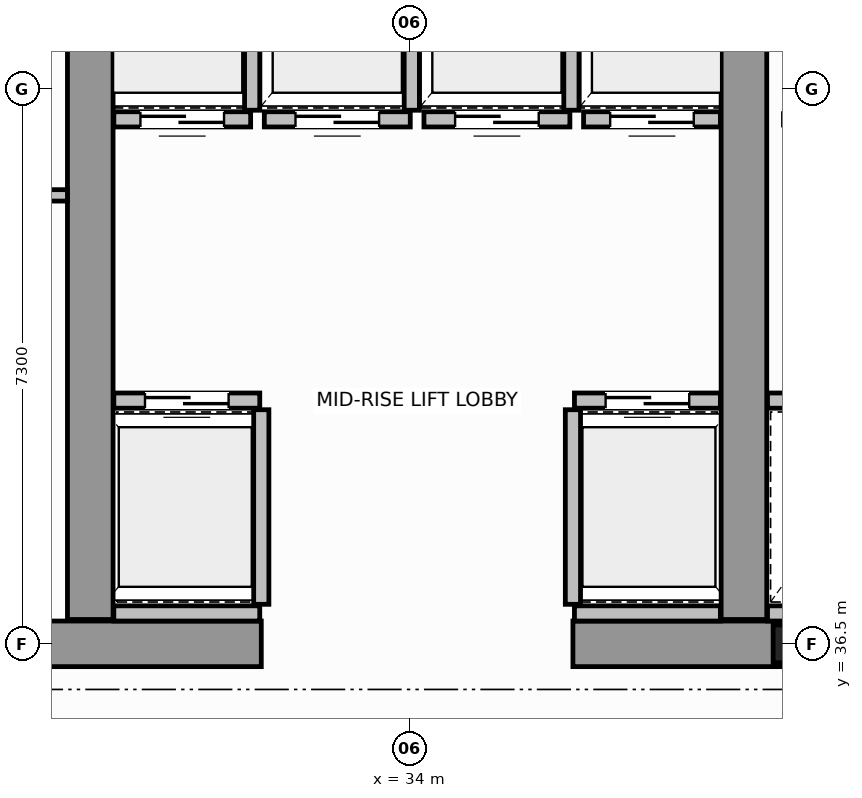
"""IFC4 building model, lengths in metres.
Left out: names, types, materials, properties, quantities, classifications, styles, units other than length and angle.
Written with IfcOpenShell. Run it as: python <this file> out.ifc"""

import sys

from ifc_helpers import new_model, si_unit, direction, frame, frame_2d, origin, origin_2d, place, context, subcontext, project, spatial, rectangle, i_section, extrude, source, transform, mapped, element, fill, save


model = new_model("IFC4")
c1 = context("Model", 3, precision=1e-05, world=origin(), true_north=direction((0.0, 1.0)))
c2 = subcontext(c1, "Body", "Model", "MODEL_VIEW")
j1 = project(units=[si_unit("LENGTHUNIT", "METRE"), si_unit("PLANEANGLEUNIT", "RADIAN")], contexts=[c1])
p1 = place(None, origin())
s1 = spatial("IfcSite", under=j1, at=p1, CompositionType="ELEMENT")
p2 = place(p1, origin())
s2 = spatial("IfcBuilding", under=s1, at=p2, CompositionType="ELEMENT")
p3 = place(p2, frame((0.0, 0.0, 184.2)))
s3 = spatial("IfcBuildingStorey", under=s2, at=p3, CompositionType="ELEMENT", Elevation=184.2)
m1 = source(origin(), c2, "Body", "SweptSolid", [
    extrude(i_section(OverallWidth=0.432, OverallDepth=0.498, WebThickness=0.055, FlangeThickness=0.068, FilletRadius=0.015, at=origin_2d()), origin(), (0.0, 0.0, 1.0), 3.8),
])
p4 = place(p3, frame((39.0, 36.5, 0.0), z_axis=(0.0, 0.0, 1.0), x_axis=(1.0, 0.0, 0.0)))
e1 = element("IfcColumn", 1, at=p4, inside=s3, PredefinedType="COLUMN", context=c2, shape_type="MappedRepresentation", body=[
    mapped(m1, transform((0.0, 0.0, 0.0), scale=1.0)),
])
for number, where, z_axis, x_axis in (
    (2, (27.55, 36.5, 0.0), (0.0, 0.0, 1.0), (1.0, 0.0, 0.0)),
    (3, (36.15, 36.5, 0.0), (0.0, 0.0, 1.0), (1.0, 0.0, 0.0)),
):
    element("IfcWall", number, at=place(p3, frame(where, z_axis=z_axis, x_axis=x_axis)), inside=s3, PredefinedType="SHEAR", context=c2, shape_type="SweptSolid", body=[
        extrude(rectangle(XDim=4.5, YDim=0.6, at=frame_2d((2.25, 0.0))), origin(), (0.0, 0.0, 1.0), 3.8),
    ])
for number, where, z_axis, x_axis in (
    (4, (29.8, 36.82, 0.0), (0.0, 0.0, 1.0), (0.0, 1.0, 0.0)),
    (5, (38.4, 36.82, 0.0), (0.0, 0.0, 1.0), (0.0, 1.0, 0.0)),
):
    element("IfcWall", number, at=place(p3, frame(where, z_axis=z_axis, x_axis=x_axis)), inside=s3, PredefinedType="SHEAR", context=c2, shape_type="SweptSolid", body=[
        extrude(rectangle(XDim=9.38, YDim=0.6, at=frame_2d((4.69, 0.0))), origin(), (0.0, 0.0, 1.0), 3.8),
    ])
p5 = place(p3, frame((30.11, 39.7, 0.0), z_axis=(0.0, 0.0, 1.0), x_axis=(1.0, 0.0, 0.0)))
e6 = element("IfcWall", 6, at=p5, inside=s3, PredefinedType="SOLIDWALL", context=c2, shape_type="SweptSolid", body=[
    extrude(rectangle(XDim=1.92, YDim=0.2, at=frame_2d((0.96, 0.0))), origin(), (0.0, 0.0, 1.0), 3.58),
])
p6 = place(p5, frame((0.41, 0.0, 0.0)))
e7 = element("IfcOpeningElement", 7, at=p6, cuts=e6, PredefinedType="OPENING", context=c2, shape_type="SweptSolid", body=[
    extrude(rectangle(XDim=1.1, YDim=2.15, at=frame_2d((0.55, 1.075))), frame((0.0, 0.11, 0.0), z_axis=(0.0, -1.0, 0.0), x_axis=(1.0, 0.0, 0.0)), (0.0, 0.0, 1.0), 0.22),
])
p7 = place(p3, frame((30.11, 36.9, 0.0), z_axis=(0.0, 0.0, 1.0), x_axis=(1.0, 0.0, 0.0)))
e8 = element("IfcWall", 8, at=p7, inside=s3, PredefinedType="SOLIDWALL", context=c2, shape_type="SweptSolid", body=[
    extrude(rectangle(XDim=1.92, YDim=0.2, at=frame_2d((0.96, 0.0))), origin(), (0.0, 0.0, 1.0), 3.58),
])
p8 = place(p3, frame((32.05, 37.02, 0.0), z_axis=(0.0, 0.0, 1.0), x_axis=(0.0, 1.0, 0.0)))
e9 = element("IfcWall", 9, at=p8, inside=s3, PredefinedType="SOLIDWALL", context=c2, shape_type="SweptSolid", body=[
    extrude(rectangle(XDim=2.56, YDim=0.2, at=frame_2d((1.28, 0.0))), origin(), (0.0, 0.0, 1.0), 3.58),
])
p9 = place(p3, frame((36.17, 39.7, 0.0), z_axis=(0.0, 0.0, 1.0), x_axis=(1.0, 0.0, 0.0)))
e10 = element("IfcWall", 10, at=p9, inside=s3, PredefinedType="SOLIDWALL", context=c2, shape_type="SweptSolid", body=[
    extrude(rectangle(XDim=1.92, YDim=0.2, at=frame_2d((0.96, 0.0))), origin(), (0.0, 0.0, 1.0), 3.58),
])
p10 = place(p9, frame((0.41, 0.0, 0.0)))
e11 = element("IfcOpeningElement", 11, at=p10, cuts=e10, PredefinedType="OPENING", context=c2, shape_type="SweptSolid", body=[
    extrude(rectangle(XDim=1.1, YDim=2.15, at=frame_2d((0.55, 1.075))), frame((0.0, 0.11, 0.0), z_axis=(0.0, -1.0, 0.0), x_axis=(1.0, 0.0, 0.0)), (0.0, 0.0, 1.0), 0.22),
])
p11 = place(p3, frame((36.17, 36.9, 0.0), z_axis=(0.0, 0.0, 1.0), x_axis=(1.0, 0.0, 0.0)))
e12 = element("IfcWall", 12, at=p11, inside=s3, PredefinedType="SOLIDWALL", context=c2, shape_type="SweptSolid", body=[
    extrude(rectangle(XDim=1.92, YDim=0.2, at=frame_2d((0.96, 0.0))), origin(), (0.0, 0.0, 1.0), 3.58),
])
p12 = place(p3, frame((36.15, 37.02, 0.0), z_axis=(0.0, 0.0, 1.0), x_axis=(0.0, 1.0, 0.0)))
e13 = element("IfcWall", 13, at=p12, inside=s3, PredefinedType="SOLIDWALL", context=c2, shape_type="SweptSolid", body=[
    extrude(rectangle(XDim=2.56, YDim=0.2, at=frame_2d((1.28, 0.0))), origin(), (0.0, 0.0, 1.0), 3.58),
])
p13 = place(p3, frame((30.11, 43.4, 0.0), z_axis=(0.0, 0.0, 1.0), x_axis=(1.0, 0.0, 0.0)))
e14 = element("IfcWall", 14, at=p13, inside=s3, PredefinedType="SOLIDWALL", context=c2, shape_type="SweptSolid", body=[
    extrude(rectangle(XDim=1.8, YDim=0.2, at=frame_2d((0.9, 0.0))), origin(), (0.0, 0.0, 1.0), 3.58),
])
p14 = place(p13, frame((0.35, 0.0, 0.0)))
e15 = element("IfcOpeningElement", 15, at=p14, cuts=e14, PredefinedType="OPENING", context=c2, shape_type="SweptSolid", body=[
    extrude(rectangle(XDim=1.1, YDim=2.15, at=frame_2d((0.55, 1.075))), frame((0.0, 0.11, 0.0), z_axis=(0.0, -1.0, 0.0), x_axis=(1.0, 0.0, 0.0)), (0.0, 0.0, 1.0), 0.22),
])
p15 = place(p3, frame((31.93, 43.52, 0.0), z_axis=(0.0, 0.0, 1.0), x_axis=(0.0, 1.0, 0.0)))
e16 = element("IfcWall", 16, at=p15, inside=s3, PredefinedType="SOLIDWALL", context=c2, shape_type="SweptSolid", body=[
    extrude(rectangle(XDim=2.56, YDim=0.2, at=frame_2d((1.28, 0.0))), origin(), (0.0, 0.0, 1.0), 3.58),
])
p16 = place(p3, frame((32.09, 43.4, 0.0), z_axis=(0.0, 0.0, 1.0), x_axis=(1.0, 0.0, 0.0)))
e17 = element("IfcWall", 17, at=p16, inside=s3, PredefinedType="SOLIDWALL", context=c2, shape_type="SweptSolid", body=[
    extrude(rectangle(XDim=1.92, YDim=0.2, at=frame_2d((0.96, 0.0))), origin(), (0.0, 0.0, 1.0), 3.58),
])
p17 = place(p16, frame((0.41, 0.0, 0.0)))
e18 = element("IfcOpeningElement", 18, at=p17, cuts=e17, PredefinedType="OPENING", context=c2, shape_type="SweptSolid", body=[
    extrude(rectangle(XDim=1.1, YDim=2.15, at=frame_2d((0.55, 1.075))), frame((0.0, 0.11, 0.0), z_axis=(0.0, -1.0, 0.0), x_axis=(1.0, 0.0, 0.0)), (0.0, 0.0, 1.0), 0.22),
])
p18 = place(p3, frame((34.03, 43.52, 0.0), z_axis=(0.0, 0.0, 1.0), x_axis=(0.0, 1.0, 0.0)))
e19 = element("IfcWall", 19, at=p18, inside=s3, PredefinedType="SOLIDWALL", context=c2, shape_type="SweptSolid", body=[
    extrude(rectangle(XDim=2.56, YDim=0.2, at=frame_2d((1.28, 0.0))), origin(), (0.0, 0.0, 1.0), 3.58),
])
p19 = place(p3, frame((34.19, 43.4, 0.0), z_axis=(0.0, 0.0, 1.0), x_axis=(1.0, 0.0, 0.0)))
e20 = element("IfcWall", 20, at=p19, inside=s3, PredefinedType="SOLIDWALL", context=c2, shape_type="SweptSolid", body=[
    extrude(rectangle(XDim=1.92, YDim=0.2, at=frame_2d((0.96, 0.0))), origin(), (0.0, 0.0, 1.0), 3.58),
])
p20 = place(p19, frame((0.41, 0.0, 0.0)))
e21 = element("IfcOpeningElement", 21, at=p20, cuts=e20, PredefinedType="OPENING", context=c2, shape_type="SweptSolid", body=[
    extrude(rectangle(XDim=1.1, YDim=2.15, at=frame_2d((0.55, 1.075))), frame((0.0, 0.11, 0.0), z_axis=(0.0, -1.0, 0.0), x_axis=(1.0, 0.0, 0.0)), (0.0, 0.0, 1.0), 0.22),
])
p21 = place(p3, frame((36.13, 43.52, 0.0), z_axis=(0.0, 0.0, 1.0), x_axis=(0.0, 1.0, 0.0)))
e22 = element("IfcWall", 22, at=p21, inside=s3, PredefinedType="SOLIDWALL", context=c2, shape_type="SweptSolid", body=[
    extrude(rectangle(XDim=2.56, YDim=0.2, at=frame_2d((1.28, 0.0))), origin(), (0.0, 0.0, 1.0), 3.58),
])
p22 = place(p3, frame((36.29, 43.4, 0.0), z_axis=(0.0, 0.0, 1.0), x_axis=(1.0, 0.0, 0.0)))
e23 = element("IfcWall", 23, at=p22, inside=s3, PredefinedType="SOLIDWALL", context=c2, shape_type="SweptSolid", body=[
    extrude(rectangle(XDim=1.8, YDim=0.2, at=frame_2d((0.9, 0.0))), origin(), (0.0, 0.0, 1.0), 3.58),
])
p23 = place(p22, frame((0.35, 0.0, 0.0)))
e24 = element("IfcOpeningElement", 24, at=p23, cuts=e23, PredefinedType="OPENING", context=c2, shape_type="SweptSolid", body=[
    extrude(rectangle(XDim=1.1, YDim=2.15, at=frame_2d((0.55, 1.075))), frame((0.0, 0.11, 0.0), z_axis=(0.0, -1.0, 0.0), x_axis=(1.0, 0.0, 0.0)), (0.0, 0.0, 1.0), 0.22),
])
for number, where, z_axis, x_axis in (
    (25, (38.71, 39.7, 0.0), (0.0, 0.0, 1.0), (1.0, 0.0, 0.0)),
    (26, (38.71, 36.9, 0.0), (0.0, 0.0, 1.0), (1.0, 0.0, 0.0)),
):
    element("IfcWall", number, at=place(p3, frame(where, z_axis=z_axis, x_axis=x_axis)), inside=s3, PredefinedType="SOLIDWALL", context=c2, shape_type="SweptSolid", body=[
        extrude(rectangle(XDim=1.92, YDim=0.2, at=frame_2d((0.96, 0.0))), origin(), (0.0, 0.0, 1.0), 3.58),
    ])
p24 = place(p3, frame((21.5, 42.4, 0.0), z_axis=(0.0, 0.0, 1.0), x_axis=(1.0, 0.0, 0.0)))
e27 = element("IfcWall", 27, at=p24, inside=s3, PredefinedType="PARTITIONING", context=c2, shape_type="SweptSolid", body=[
    extrude(rectangle(XDim=8.0, YDim=0.15, at=frame_2d((4.0, 0.0))), origin(), (0.0, 0.0, 1.0), 3.58),
])
p25 = place(p24, frame((3.4, 0.0, 0.0)))
e28 = element("IfcOpeningElement", 28, at=p25, cuts=e27, PredefinedType="OPENING", context=c2, shape_type="SweptSolid", body=[
    extrude(rectangle(XDim=0.9, YDim=2.1, at=frame_2d((0.45, 1.05))), frame((0.0, 0.085, 0.0), z_axis=(0.0, -1.0, 0.0), x_axis=(1.0, 0.0, 0.0)), (0.0, 0.0, 1.0), 0.17),
])
m2 = source(origin(), c2, "Body", "SweptSolid", [
    extrude(rectangle(XDim=1.1, YDim=2.15, at=frame_2d((0.55, 1.075))), frame((0.0, 0.025, 0.0), z_axis=(0.0, -1.0, 0.0), x_axis=(1.0, 0.0, 0.0)), (0.0, 0.0, 1.0), 0.05),
])
p26 = place(p6, origin())
e29 = element("IfcDoor", 29, at=p26, inside=s3, OperationType="DOUBLE_DOOR_SLIDING", PredefinedType="DOOR", context=c2, shape_type="MappedRepresentation", body=[
    mapped(m2, transform((0.0, 0.0, 0.0), scale=1.0)),
])
fill(e7, e29)
p27 = place(p10, origin())
e30 = element("IfcDoor", 30, at=p27, inside=s3, OperationType="DOUBLE_DOOR_SLIDING", PredefinedType="DOOR", context=c2, shape_type="MappedRepresentation", body=[
    mapped(m2, transform((0.0, 0.0, 0.0), scale=1.0)),
])
fill(e11, e30)
p28 = place(p14, origin())
e31 = element("IfcDoor", 31, at=p28, inside=s3, OperationType="DOUBLE_DOOR_SLIDING", PredefinedType="DOOR", context=c2, shape_type="MappedRepresentation", body=[
    mapped(m2, transform((0.0, 0.0, 0.0), scale=1.0)),
])
fill(e15, e31)
p29 = place(p17, origin())
e32 = element("IfcDoor", 32, at=p29, inside=s3, OperationType="DOUBLE_DOOR_SLIDING", PredefinedType="DOOR", context=c2, shape_type="MappedRepresentation", body=[
    mapped(m2, transform((0.0, 0.0, 0.0), scale=1.0)),
])
fill(e18, e32)
p30 = place(p20, origin())
e33 = element("IfcDoor", 33, at=p30, inside=s3, OperationType="DOUBLE_DOOR_SLIDING", PredefinedType="DOOR", context=c2, shape_type="MappedRepresentation", body=[
    mapped(m2, transform((0.0, 0.0, 0.0), scale=1.0)),
])
fill(e21, e33)
p31 = place(p23, origin())
e34 = element("IfcDoor", 34, at=p31, inside=s3, OperationType="DOUBLE_DOOR_SLIDING", PredefinedType="DOOR", context=c2, shape_type="MappedRepresentation", body=[
    mapped(m2, transform((0.0, 0.0, 0.0), scale=1.0)),
])
fill(e24, e34)
save(model, sys.argv[1])
